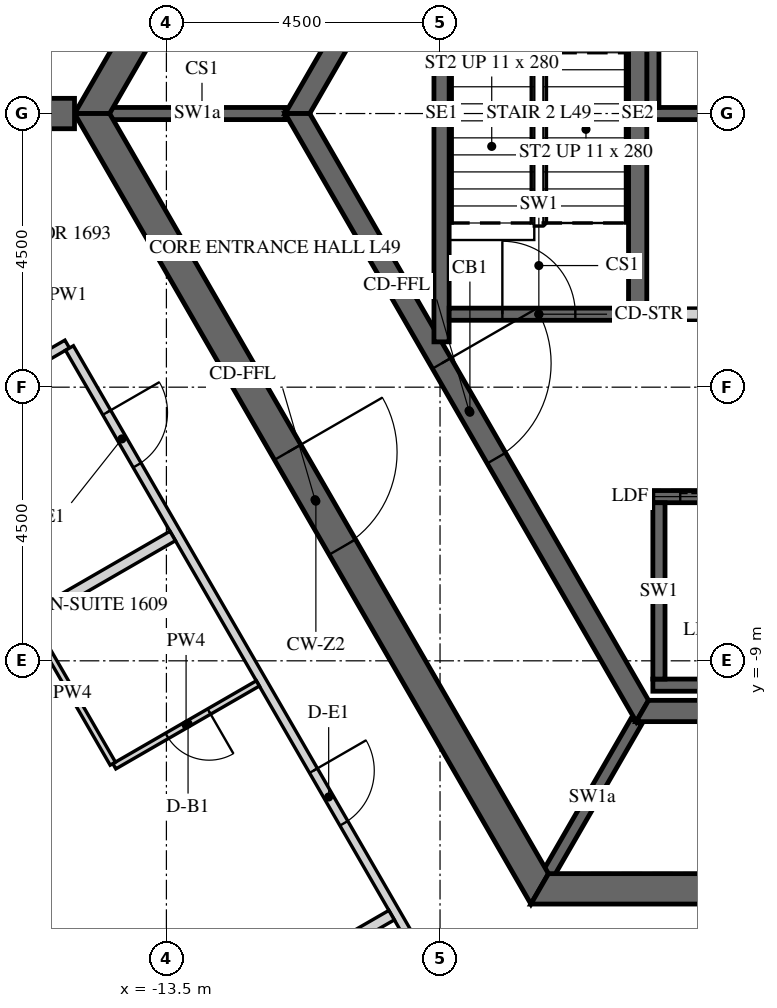
"""IFC4 building model, lengths in metres.
Left out: names, types, materials, properties, quantities, classifications, styles, units other than length and angle.
Written with IfcOpenShell. Run it as: python <this file> out.ifc"""

import sys

from ifc_helpers import new_model, si_unit, direction, frame, frame_2d, origin, place, context, subcontext, project, spatial, polyline, rectangle, outline, extrude, element, fill, save


model = new_model("IFC4")
c1 = context("Model", 3, precision=1e-05, world=origin(), true_north=direction((0.0, 1.0)))
c2 = subcontext(c1, "Body", "Model", "MODEL_VIEW")
j1 = project(units=[si_unit("LENGTHUNIT", "METRE"), si_unit("PLANEANGLEUNIT", "RADIAN")], contexts=[c1])
p1 = place(None, origin())
s1 = spatial("IfcSite", under=j1, at=p1, CompositionType="ELEMENT")
p2 = place(p1, origin())
s2 = spatial("IfcBuilding", under=s1, at=p2, CompositionType="ELEMENT")
p3 = place(p2, frame((0.0, 0.0, 207.3)))
s3 = spatial("IfcBuildingStorey", under=s2, at=p3, CompositionType="ELEMENT", Elevation=207.3)
p4 = place(p3, frame((-7.361, 12.75, -0.15), z_axis=(0.0, 0.0, 1.0), x_axis=(-0.50000571537, -0.866022103989, 0.0)))
e1 = element("IfcWall", 1, at=p4, inside=s3, PredefinedType="SHEAR", context=c2, shape_type="SweptSolid", body=[
    extrude(outline(polyline([(-0.144, -0.25), (14.867, -0.25), (14.578, 0.25), (0.144, 0.25), (-0.144, -0.25)])), origin(), (0.0, 0.0, 1.0), 3.9),
])
p5 = place(p4, frame((6.49, 0.0, 0.15)))
e2 = element("IfcOpeningElement", 2, at=p5, cuts=e1, PredefinedType="OPENING", context=c2, shape_type="SweptSolid", body=[
    extrude(rectangle(XDim=1.8, YDim=2.4, at=frame_2d((0.9, 1.2))), frame((0.0, 0.26, 0.0), z_axis=(0.0, -1.0, 0.0), x_axis=(1.0, 0.0, 0.0)), (0.0, 0.0, 1.0), 0.52),
])
p6 = place(p3, frame((-14.722, 0.0, -0.15), z_axis=(0.0, 0.0, 1.0), x_axis=(0.50000571537, -0.866022103989, 0.0)))
e3 = element("IfcWall", 3, at=p6, inside=s3, PredefinedType="SHEAR", context=c2, shape_type="SweptSolid", body=[
    extrude(outline(polyline([(-0.144, -0.25), (14.867, -0.25), (14.578, 0.25), (0.144, 0.25), (-0.144, -0.25)])), origin(), (0.0, 0.0, 1.0), 3.9),
])
p7 = place(p6, frame((6.432, 0.0, 0.15)))
e4 = element("IfcOpeningElement", 4, at=p7, cuts=e3, PredefinedType="OPENING", context=c2, shape_type="SweptSolid", body=[
    extrude(rectangle(XDim=1.8, YDim=2.4, at=frame_2d((0.9, 1.2))), frame((0.0, 0.26, 0.0), z_axis=(0.0, -1.0, 0.0), x_axis=(1.0, 0.0, 0.0)), (0.0, 0.0, 1.0), 0.52),
])
p8 = place(p3, frame((-7.361, -12.75, -0.15), z_axis=(0.0, 0.0, 1.0), x_axis=(1.0, 0.0, 0.0)))
e5 = element("IfcWall", 5, at=p8, inside=s3, PredefinedType="SHEAR", context=c2, shape_type="SweptSolid", body=[
    extrude(outline(polyline([(-0.144, -0.25), (14.866, -0.25), (14.578, 0.25), (0.144, 0.25), (-0.144, -0.25)])), origin(), (0.0, 0.0, 1.0), 3.9),
])
p9 = place(p8, frame((6.761, 0.0, 0.15)))
e6 = element("IfcOpeningElement", 6, at=p9, cuts=e5, PredefinedType="OPENING", context=c2, shape_type="SweptSolid", body=[
    extrude(rectangle(XDim=1.2, YDim=2.4, at=frame_2d((0.6, 1.2))), frame((0.0, 0.26, 0.0), z_axis=(0.0, -1.0, 0.0), x_axis=(1.0, 0.0, 0.0)), (0.0, 0.0, 1.0), 0.52),
])
p10 = place(p3, frame((-15.011, 0.0, -0.15), z_axis=(0.0, 0.0, 1.0), x_axis=(-1.0, 0.0, 0.0)))
e7 = element("IfcWall", 7, at=p10, inside=s3, PredefinedType="SHEAR", context=c2, shape_type="SweptSolid", body=[
    extrude(rectangle(XDim=15.424, YDim=0.5, at=frame_2d((7.712, 0.0))), origin(), (0.0, 0.0, 1.0), 3.9),
])
p11 = place(p10, frame((6.812, 0.0, 0.15)))
e8 = element("IfcOpeningElement", 8, at=p11, cuts=e7, PredefinedType="OPENING", context=c2, shape_type="SweptSolid", body=[
    extrude(rectangle(XDim=1.8, YDim=2.4, at=frame_2d((0.9, 1.2))), frame((0.0, 0.26, 0.0), z_axis=(0.0, -1.0, 0.0), x_axis=(1.0, 0.0, 0.0)), (0.0, 0.0, 1.0), 0.52),
])
p12 = place(p3, frame((-5.673, 9.825, -0.15), z_axis=(0.0, 0.0, 1.0), x_axis=(-0.499995046907, -0.866028263435, 0.0)))
e9 = element("IfcWall", 9, at=p12, inside=s3, PredefinedType="SHEAR", context=c2, shape_type="SweptSolid", body=[
    extrude(outline(polyline([(-0.101, -0.175), (11.446, -0.175), (11.244, 0.175), (0.101, 0.175), (-0.101, -0.175)])), origin(), (0.0, 0.0, 1.0), 3.9),
])
p13 = place(p12, frame((4.801, 0.0, 0.15)))
e10 = element("IfcOpeningElement", 10, at=p13, cuts=e9, PredefinedType="OPENING", context=c2, shape_type="SweptSolid", body=[
    extrude(rectangle(XDim=1.8, YDim=2.4, at=frame_2d((0.9, 1.2))), frame((0.0, 0.185, 0.0), z_axis=(0.0, -1.0, 0.0), x_axis=(1.0, 0.0, 0.0)), (0.0, 0.0, 1.0), 0.37),
])
p14 = place(p3, frame((-11.345, 0.0, -0.15), z_axis=(0.0, 0.0, 1.0), x_axis=(0.499995046907, -0.866028263435, 0.0)))
e11 = element("IfcWall", 11, at=p14, inside=s3, PredefinedType="SHEAR", context=c2, shape_type="SweptSolid", body=[
    extrude(outline(polyline([(-0.101, -0.175), (11.446, -0.175), (11.244, 0.175), (0.101, 0.175), (-0.101, -0.175)])), origin(), (0.0, 0.0, 1.0), 3.9),
])
p15 = place(p14, frame((4.744, 0.0, 0.15)))
e12 = element("IfcOpeningElement", 12, at=p15, cuts=e11, PredefinedType="OPENING", context=c2, shape_type="SweptSolid", body=[
    extrude(rectangle(XDim=1.8, YDim=2.4, at=frame_2d((0.9, 1.2))), frame((0.0, 0.185, 0.0), z_axis=(0.0, -1.0, 0.0), x_axis=(1.0, 0.0, 0.0)), (0.0, 0.0, 1.0), 0.37),
])
p16 = place(p3, frame((-5.673, -9.825, -0.15), z_axis=(0.0, 0.0, 1.0), x_axis=(1.0, 0.0, 0.0)))
e13 = element("IfcWall", 13, at=p16, inside=s3, PredefinedType="SHEAR", context=c2, shape_type="SweptSolid", body=[
    extrude(outline(polyline([(-0.101, -0.175), (11.446, -0.175), (11.244, 0.175), (0.101, 0.175), (-0.101, -0.175)])), origin(), (0.0, 0.0, 1.0), 3.9),
])
p17 = place(p3, frame((-5.6, 0.0, -0.25), z_axis=(0.0, 0.0, 1.0), x_axis=(1.0, 0.0, 0.0)))
e14 = element("IfcWall", 14, at=p17, inside=s3, PredefinedType="SHEAR", context=c2, shape_type="SweptSolid", body=[
    extrude(rectangle(XDim=11.2, YDim=0.2, at=frame_2d((5.6, 0.0))), origin(), (0.0, 0.0, 1.0), 3.9),
])
p18 = place(p3, frame((-5.5, 0.1, -0.25), z_axis=(0.0, 0.0, 1.0), x_axis=(0.0, 1.0, 0.0)))
e15 = element("IfcWall", 15, at=p18, inside=s3, PredefinedType="SHEAR", context=c2, shape_type="SweptSolid", body=[
    extrude(rectangle(XDim=3.1, YDim=0.2, at=frame_2d((1.55, 0.0))), origin(), (0.0, 0.0, 1.0), 3.9),
])
p19 = place(p3, frame((-5.5, -6.3, -0.25), z_axis=(0.0, 0.0, 1.0), x_axis=(1.0, 0.0, 0.0)))
e16 = element("IfcWall", 16, at=p19, inside=s3, PredefinedType="SHEAR", context=c2, shape_type="SweptSolid", body=[
    extrude(rectangle(XDim=9.2, YDim=0.2, at=frame_2d((4.6, 0.0))), origin(), (0.0, 0.0, 1.0), 3.9),
])
p20 = place(p19, frame((0.45, 0.0, 0.25)))
e17 = element("IfcOpeningElement", 17, at=p20, cuts=e16, PredefinedType="OPENING", context=c2, shape_type="SweptSolid", body=[
    extrude(rectangle(XDim=1.1, YDim=2.1, at=frame_2d((0.55, 1.05))), frame((0.0, 0.11, 0.0), z_axis=(0.0, -1.0, 0.0), x_axis=(1.0, 0.0, 0.0)), (0.0, 0.0, 1.0), 0.22),
])
p21 = place(p19, frame((2.25, 0.0, 0.25)))
e18 = element("IfcOpeningElement", 18, at=p21, cuts=e16, PredefinedType="OPENING", context=c2, shape_type="SweptSolid", body=[
    extrude(rectangle(XDim=1.1, YDim=2.1, at=frame_2d((0.55, 1.05))), frame((0.0, 0.11, 0.0), z_axis=(0.0, -1.0, 0.0), x_axis=(1.0, 0.0, 0.0)), (0.0, 0.0, 1.0), 0.22),
])
p22 = place(p19, frame((4.05, 0.0, 0.25)))
e19 = element("IfcOpeningElement", 19, at=p22, cuts=e16, PredefinedType="OPENING", context=c2, shape_type="SweptSolid", body=[
    extrude(rectangle(XDim=1.1, YDim=2.1, at=frame_2d((0.55, 1.05))), frame((0.0, 0.11, 0.0), z_axis=(0.0, -1.0, 0.0), x_axis=(1.0, 0.0, 0.0)), (0.0, 0.0, 1.0), 0.22),
])
p23 = place(p19, frame((5.85, 0.0, 0.25)))
e20 = element("IfcOpeningElement", 20, at=p23, cuts=e16, PredefinedType="OPENING", context=c2, shape_type="SweptSolid", body=[
    extrude(rectangle(XDim=1.1, YDim=2.1, at=frame_2d((0.55, 1.05))), frame((0.0, 0.11, 0.0), z_axis=(0.0, -1.0, 0.0), x_axis=(1.0, 0.0, 0.0)), (0.0, 0.0, 1.0), 0.22),
])
p24 = place(p19, frame((7.65, 0.0, 0.25)))
e21 = element("IfcOpeningElement", 21, at=p24, cuts=e16, PredefinedType="OPENING", context=c2, shape_type="SweptSolid", body=[
    extrude(rectangle(XDim=1.1, YDim=2.1, at=frame_2d((0.55, 1.05))), frame((0.0, 0.11, 0.0), z_axis=(0.0, -1.0, 0.0), x_axis=(1.0, 0.0, 0.0)), (0.0, 0.0, 1.0), 0.22),
])
p25 = place(p3, frame((-5.5, -9.4, -0.25), z_axis=(0.0, 0.0, 1.0), x_axis=(1.0, 0.0, 0.0)))
e22 = element("IfcWall", 22, at=p25, inside=s3, PredefinedType="SHEAR", context=c2, shape_type="SweptSolid", body=[
    extrude(rectangle(XDim=9.2, YDim=0.2, at=frame_2d((4.6, 0.0))), origin(), (0.0, 0.0, 1.0), 3.9),
])
p26 = place(p3, frame((-5.4, -9.3, -0.25), z_axis=(0.0, 0.0, 1.0), x_axis=(0.0, 1.0, 0.0)))
e23 = element("IfcWall", 23, at=p26, inside=s3, PredefinedType="SHEAR", context=c2, shape_type="SweptSolid", body=[
    extrude(rectangle(XDim=2.9, YDim=0.2, at=frame_2d((1.45, 0.0))), origin(), (0.0, 0.0, 1.0), 3.9),
])
p27 = place(p3, frame((-5.6, -3.3, 0.0), z_axis=(0.0, 0.0, 1.0), x_axis=(1.0, 0.0, 0.0)))
e24 = element("IfcWall", 24, at=p27, inside=s3, PredefinedType="PARTITIONING", context=c2, shape_type="SweptSolid", body=[
    extrude(rectangle(XDim=5.5, YDim=0.2, at=frame_2d((2.75, 0.0))), origin(), (0.0, 0.0, 1.0), 3.65),
])
p28 = place(p27, frame((2.3, 0.0, 0.0)))
e25 = element("IfcOpeningElement", 25, at=p28, cuts=e24, PredefinedType="OPENING", context=c2, shape_type="SweptSolid", body=[
    extrude(rectangle(XDim=0.9, YDim=2.1, at=frame_2d((0.45, 1.05))), frame((0.0, 0.11, 0.0), z_axis=(0.0, -1.0, 0.0), x_axis=(1.0, 0.0, 0.0)), (0.0, 0.0, 1.0), 0.22),
])
for number, where, z_axis, x_axis in (
    (26, (-11.547, 0.0, -0.15), (0.0, 0.0, 1.0), (-1.0, 0.0, 0.0)),
    (27, (-5.773, -10.0, -0.15), (0.0, 0.0, 1.0), (-0.5, -0.866, 0.0)),
):
    element("IfcWall", number, at=place(p3, frame(where, z_axis=z_axis, x_axis=x_axis)), inside=s3, PredefinedType="SHEAR", context=c2, shape_type="SweptSolid", body=[
        extrude(rectangle(XDim=2.887, YDim=0.2, at=frame_2d((1.443, 0.0))), origin(), (0.0, 0.0, 1.0), 3.9),
    ])
p29 = place(p3, frame((-5.75, -3.4, -0.25), z_axis=(0.0, 0.0, 1.0), x_axis=(0.0, 1.0, 0.0)))
e28 = element("IfcWall", 28, at=p29, inside=s3, PredefinedType="SHEAR", context=c2, shape_type="SweptSolid", body=[
    extrude(rectangle(XDim=6.8, YDim=0.3, at=frame_2d((3.4, 0.0))), origin(), (0.0, 0.0, 1.0), 3.9),
])
p30 = place(p3, frame((-8.975, -3.755, -0.25), z_axis=(0.0, 0.0, 1.0), x_axis=(0.0, 1.0, 0.0)))
e29 = element("IfcWall", 29, at=p30, inside=s3, PredefinedType="SHEAR", context=c2, shape_type="SweptSolid", body=[
    extrude(rectangle(XDim=7.51, YDim=0.25, at=frame_2d((3.755, 0.0))), origin(), (0.0, 0.0, 1.0), 3.9),
])
p31 = place(p3, frame((-8.85, -3.3, -0.25), z_axis=(0.0, 0.0, 1.0), x_axis=(1.0, 0.0, 0.0)))
e30 = element("IfcWall", 30, at=p31, inside=s3, PredefinedType="SHEAR", context=c2, shape_type="SweptSolid", body=[
    extrude(rectangle(XDim=2.95, YDim=0.2, at=frame_2d((1.475, 0.0))), origin(), (0.0, 0.0, 1.0), 3.9),
])
p32 = place(p31, frame((0.875, 0.0, 0.25)))
e31 = element("IfcOpeningElement", 31, at=p32, cuts=e30, PredefinedType="OPENING", context=c2, shape_type="SweptSolid", body=[
    extrude(rectangle(XDim=1.2, YDim=2.4, at=frame_2d((0.6, 1.2))), frame((0.0, 0.11, 0.0), z_axis=(0.0, -1.0, 0.0), x_axis=(1.0, 0.0, 0.0)), (0.0, 0.0, 1.0), 0.22),
])
p33 = place(p3, frame((-16.49, -4.576, 0.0), z_axis=(0.0, 0.0, 1.0), x_axis=(0.865993845424, 0.5000546567, 0.0)))
e32 = element("IfcWall", 32, at=p33, inside=s3, PredefinedType="PARTITIONING", context=c2, shape_type="SweptSolid", body=[
    extrude(rectangle(XDim=1.569, YDim=0.15, at=frame_2d((0.785, 0.0))), origin(), (0.0, 0.0, 1.0), 2.988),
])
p34 = place(p3, frame((-15.094, -3.856, 0.0), z_axis=(0.0, 0.0, 1.0), x_axis=(0.500006037985, -0.866021917724, 0.0)))
e33 = element("IfcWall", 33, at=p34, inside=s3, PredefinedType="PARTITIONING", context=c2, shape_type="SweptSolid", body=[
    extrude(rectangle(XDim=12.867, YDim=0.15, at=frame_2d((6.434, 0.0))), origin(), (0.0, 0.0, 1.0), 2.988),
])
p35 = place(p34, frame((1.225, 0.0, 0.0)))
e34 = element("IfcOpeningElement", 34, at=p35, cuts=e33, PredefinedType="OPENING", context=c2, shape_type="SweptSolid", body=[
    extrude(rectangle(XDim=1.0, YDim=2.1, at=frame_2d((0.5, 1.05))), frame((0.0, 0.085, 0.0), z_axis=(0.0, -1.0, 0.0), x_axis=(1.0, 0.0, 0.0)), (0.0, 0.0, 1.0), 0.17),
])
p36 = place(p34, frame((8.025, 0.0, 0.0)))
e35 = element("IfcOpeningElement", 35, at=p36, cuts=e33, PredefinedType="OPENING", context=c2, shape_type="SweptSolid", body=[
    extrude(rectangle(XDim=1.0, YDim=2.1, at=frame_2d((0.5, 1.05))), frame((0.0, 0.085, 0.0), z_axis=(0.0, -1.0, 0.0), x_axis=(1.0, 0.0, 0.0)), (0.0, 0.0, 1.0), 0.17),
])
p37 = place(p34, frame((11.717, 0.0, 0.0)))
e36 = element("IfcOpeningElement", 36, at=p37, cuts=e33, PredefinedType="OPENING", context=c2, shape_type="SweptSolid", body=[
    extrude(rectangle(XDim=1.0, YDim=2.1, at=frame_2d((0.5, 1.05))), frame((0.0, 0.085, 0.0), z_axis=(0.0, -1.0, 0.0), x_axis=(1.0, 0.0, 0.0)), (0.0, 0.0, 1.0), 0.17),
])
p38 = place(p3, frame((-24.114, -13.134, 0.0), z_axis=(0.0, 0.0, 1.0), x_axis=(0.866024931941, 0.500000817256, 0.0)))
e37 = element("IfcWall", 37, at=p38, inside=s3, PredefinedType="PARTITIONING", context=c2, shape_type="SweptSolid", body=[
    extrude(rectangle(XDim=12.375, YDim=0.18, at=frame_2d((6.188, 0.0))), origin(), (0.0, 0.0, 1.0), 2.988),
])
p39 = place(p3, frame((-11.996, -9.372, 0.0), z_axis=(0.0, 0.0, 1.0), x_axis=(-0.866012511928, -0.500022328685, 0.0)))
e38 = element("IfcWall", 38, at=p39, inside=s3, PredefinedType="PARTITIONING", context=c2, shape_type="SweptSolid", body=[
    extrude(rectangle(XDim=2.725, YDim=0.1, at=frame_2d((1.363, 0.0))), origin(), (0.0, 0.0, 1.0), 2.988),
])
p40 = place(p39, frame((0.925, 0.0, 0.0)))
e39 = element("IfcOpeningElement", 39, at=p40, cuts=e38, PredefinedType="OPENING", context=c2, shape_type="SweptSolid", body=[
    extrude(rectangle(XDim=0.8, YDim=2.1, at=frame_2d((0.4, 1.05))), frame((0.0, 0.06, 0.0), z_axis=(0.0, -1.0, 0.0), x_axis=(1.0, 0.0, 0.0)), (0.0, 0.0, 1.0), 0.12),
])
p41 = place(p3, frame((-14.381, -10.691, 0.0), z_axis=(0.0, 0.0, 1.0), x_axis=(-0.500008456887, 0.866020521143, 0.0)))
e40 = element("IfcWall", 40, at=p41, inside=s3, PredefinedType="PARTITIONING", context=c2, shape_type="SweptSolid", body=[
    extrude(rectangle(XDim=2.66, YDim=0.1, at=frame_2d((1.33, 0.0))), origin(), (0.0, 0.0, 1.0), 2.988),
])
p42 = place(p3, frame((-20.513, -19.37, 0.0), z_axis=(0.0, 0.0, 1.0), x_axis=(0.866024931941, 0.500000817256, 0.0)))
e41 = element("IfcWall", 41, at=p42, inside=s3, PredefinedType="PARTITIONING", context=c2, shape_type="SweptSolid", body=[
    extrude(rectangle(XDim=12.375, YDim=0.18, at=frame_2d((6.188, 0.0))), origin(), (0.0, 0.0, 1.0), 2.988),
])
p43 = place(p7, origin())
e42 = element("IfcDoor", 42, at=p43, inside=s3, OperationType="DOUBLE_DOOR_SINGLE_SWING", PredefinedType="DOOR", context=c2, shape_type="SweptSolid", body=[
    extrude(rectangle(XDim=1.8, YDim=2.4, at=frame_2d((0.9, 1.2))), frame((0.0, 0.025, 0.0), z_axis=(0.0, -1.0, 0.0), x_axis=(1.0, 0.0, 0.0)), (0.0, 0.0, 1.0), 0.05),
])
fill(e4, e42)
p44 = place(p15, origin())
e43 = element("IfcDoor", 43, at=p44, inside=s3, OperationType="DOUBLE_DOOR_SINGLE_SWING", PredefinedType="DOOR", context=c2, shape_type="SweptSolid", body=[
    extrude(rectangle(XDim=1.8, YDim=2.4, at=frame_2d((0.9, 1.2))), frame((0.0, 0.025, 0.0), z_axis=(0.0, -1.0, 0.0), x_axis=(1.0, 0.0, 0.0)), (0.0, 0.0, 1.0), 0.05),
])
fill(e12, e43)
p45 = place(p32, origin())
e44 = element("IfcDoor", 44, at=p45, inside=s3, OperationType="SINGLE_SWING_LEFT", PredefinedType="DOOR", context=c2, shape_type="SweptSolid", body=[
    extrude(rectangle(XDim=1.2, YDim=2.4, at=frame_2d((0.6, 1.2))), frame((0.0, 0.025, 0.0), z_axis=(0.0, -1.0, 0.0), x_axis=(1.0, 0.0, 0.0)), (0.0, 0.0, 1.0), 0.05),
])
fill(e31, e44)
p46 = place(p20, origin())
e45 = element("IfcDoor", 45, at=p46, inside=s3, OperationType="SLIDING_TO_LEFT", PredefinedType="DOOR", context=c2, shape_type="SweptSolid", body=[
    extrude(rectangle(XDim=1.1, YDim=2.1, at=frame_2d((0.55, 1.05))), frame((0.0, 0.025, 0.0), z_axis=(0.0, -1.0, 0.0), x_axis=(1.0, 0.0, 0.0)), (0.0, 0.0, 1.0), 0.05),
])
fill(e17, e45)
p47 = place(p35, origin())
e46 = element("IfcDoor", 46, at=p47, inside=s3, OperationType="SINGLE_SWING_RIGHT", PredefinedType="DOOR", context=c2, shape_type="SweptSolid", body=[
    extrude(rectangle(XDim=1.0, YDim=2.1, at=frame_2d((0.5, 1.05))), frame((0.0, 0.025, 0.0), z_axis=(0.0, -1.0, 0.0), x_axis=(1.0, 0.0, 0.0)), (0.0, 0.0, 1.0), 0.05),
])
fill(e34, e46)
p48 = place(p36, origin())
e47 = element("IfcDoor", 47, at=p48, inside=s3, OperationType="SINGLE_SWING_RIGHT", PredefinedType="DOOR", context=c2, shape_type="SweptSolid", body=[
    extrude(rectangle(XDim=1.0, YDim=2.1, at=frame_2d((0.5, 1.05))), frame((0.0, 0.025, 0.0), z_axis=(0.0, -1.0, 0.0), x_axis=(1.0, 0.0, 0.0)), (0.0, 0.0, 1.0), 0.05),
])
fill(e35, e47)
p49 = place(p40, origin())
e48 = element("IfcDoor", 48, at=p49, inside=s3, OperationType="SINGLE_SWING_RIGHT", PredefinedType="DOOR", context=c2, shape_type="SweptSolid", body=[
    extrude(rectangle(XDim=0.8, YDim=2.1, at=frame_2d((0.4, 1.05))), frame((0.0, 0.025, 0.0), z_axis=(0.0, -1.0, 0.0), x_axis=(1.0, 0.0, 0.0)), (0.0, 0.0, 1.0), 0.05),
])
fill(e39, e48)
save(model, sys.argv[1])
